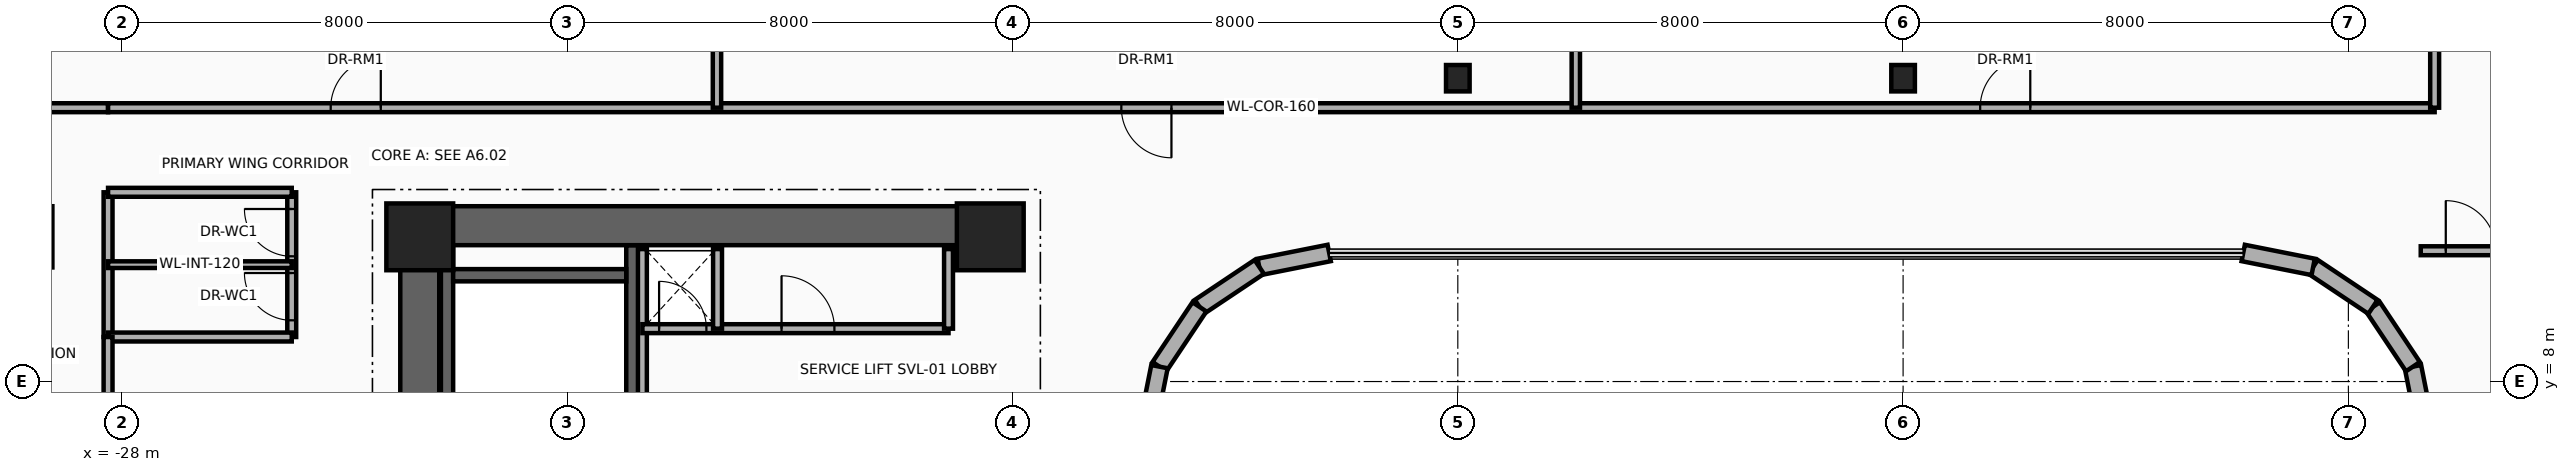
"""IFC4 building model, lengths in metres.
Left out: names, types, materials, properties, quantities, classifications, styles, units other than length and angle.
Written with IfcOpenShell. Run it as: python <this file> out.ifc"""

import sys

from ifc_helpers import new_model, si_unit, direction, frame, frame_2d, origin, origin_2d, place, context, subcontext, project, spatial, rectangle, i_section, extrude, source, transform, mapped, element, fill, save


model = new_model("IFC4")
c1 = context("Model", 3, precision=1e-05, world=origin(), true_north=direction((0.0, 1.0)))
c2 = subcontext(c1, "Body", "Model", "MODEL_VIEW")
j1 = project(units=[si_unit("LENGTHUNIT", "METRE"), si_unit("PLANEANGLEUNIT", "RADIAN")], contexts=[c1])
p1 = place(None, origin())
s1 = spatial("IfcSite", under=j1, at=p1, CompositionType="ELEMENT")
p2 = place(p1, origin())
s2 = spatial("IfcBuilding", under=s1, at=p2, CompositionType="ELEMENT")
p3 = place(p2, frame((0.0, 0.0, 142.7)))
s3 = spatial("IfcBuildingStorey", under=s2, at=p3, CompositionType="ELEMENT", Elevation=142.7)
for number, where, z_axis, x_axis in (
    (1, (-22.16, 1.78, 0.0), (0.0, 0.0, 1.0), (0.0, 1.0, 0.0)),
    (2, (-18.83, 1.78, 0.0), (0.0, 0.0, 1.0), (0.0, 1.0, 0.0)),
):
    element("IfcWall", number, at=place(p3, frame(where, z_axis=z_axis, x_axis=x_axis)), inside=s3, PredefinedType="SHEAR", context=c2, shape_type="SweptSolid", body=[
        extrude(rectangle(XDim=8.67, YDim=0.22, at=frame_2d((4.335, 0.0))), origin(), (0.0, 0.0, 1.0), 3.46),
    ])
p4 = place(p3, frame((-22.05, 9.91, 0.0), z_axis=(0.0, 0.0, 1.0), x_axis=(1.0, 0.0, 0.0)))
e3 = element("IfcWall", 3, at=p4, inside=s3, PredefinedType="SHEAR", context=c2, shape_type="SweptSolid", body=[
    extrude(rectangle(XDim=3.11, YDim=0.22, at=frame_2d((1.555, 0.0))), origin(), (0.0, 0.0, 1.0), 3.46),
])
p5 = place(p3, frame((-22.65, -11.15, 0.0), z_axis=(0.0, 0.0, 1.0), x_axis=(0.0, 1.0, 0.0)))
e4 = element("IfcWall", 4, at=p5, inside=s3, PredefinedType="SHEAR", context=c2, shape_type="SweptSolid", body=[
    extrude(rectangle(XDim=22.3, YDim=0.7, at=frame_2d((11.15, 0.0))), origin(), (0.0, 0.0, 1.0), 3.46),
])
p6 = place(p3, frame((-22.65, 10.8, 0.0), z_axis=(0.0, 0.0, 1.0), x_axis=(1.0, 0.0, 0.0)))
e5 = element("IfcWall", 5, at=p6, inside=s3, PredefinedType="SHEAR", context=c2, shape_type="SweptSolid", body=[
    extrude(rectangle(XDim=10.25, YDim=0.7, at=frame_2d((5.125, 0.0))), origin(), (0.0, 0.0, 1.0), 3.46),
])
m1 = source(origin(), c2, "Body", "SweptSolid", [
    extrude(rectangle(XDim=1.2, YDim=1.2, at=origin_2d()), origin(), (0.0, 0.0, 1.0), 3.7),
])
for number, where, z_axis, x_axis in (
    (6, (-22.65, 10.6, 0.0), (0.0, 0.0, 1.0), (1.0, 0.0, 0.0)),
    (7, (-12.4, 10.6, 0.0), (0.0, 0.0, 1.0), (1.0, 0.0, 0.0)),
):
    element("IfcColumn", number, at=place(p3, frame(where, z_axis=z_axis, x_axis=x_axis)), inside=s3, PredefinedType="COLUMN", context=c2, shape_type="MappedRepresentation", body=[
        mapped(m1, transform((0.0, 0.0, 0.0), x_axis=(1.0, 0.0, 0.0), y_axis=(0.0, 1.0, 0.0), z_axis=(0.0, 0.0, 1.0), scale=1.0)),
    ])
m2 = source(origin(), c2, "Body", "SweptSolid", [
    extrude(i_section(OverallWidth=0.424, OverallDepth=0.474, WebThickness=0.048, FlangeThickness=0.077, at=origin_2d()), origin(), (0.0, 0.0, 1.0), 3.7),
])
for number, where, z_axis, x_axis in (
    (8, (-4.0, 13.45, 0.0), (0.0, 0.0, 1.0), (1.0, 0.0, 0.0)),
    (9, (4.0, 13.45, 0.0), (0.0, 0.0, 1.0), (1.0, 0.0, 0.0)),
):
    element("IfcColumn", number, at=place(p3, frame(where, z_axis=z_axis, x_axis=x_axis)), inside=s3, PredefinedType="COLUMN", context=c2, shape_type="MappedRepresentation", body=[
        mapped(m2, transform((0.0, 0.0, 0.0), x_axis=(1.0, 0.0, 0.0), y_axis=(0.0, 1.0, 0.0), z_axis=(0.0, 0.0, 1.0), scale=1.0)),
    ])
p7 = place(p3, frame((13.41, 7.011, 0.0), z_axis=(0.0, 0.0, 1.0), x_axis=(-0.195090163074, 0.980785312019, 0.0)))
e10 = element("IfcWall", 10, at=p7, inside=s3, PredefinedType="SOLIDWALL", context=c2, shape_type="SweptSolid", body=[
    extrude(rectangle(XDim=1.281, YDim=0.3, at=frame_2d((0.641, 0.0))), origin(), (0.0, 0.0, 1.0), 3.46),
])
for number, where, z_axis, x_axis in (
    (11, (13.16, 8.268, 0.0), (0.0, 0.0, 1.0), (-0.556, 0.831, 0.0)),
    (12, (12.442, 9.342, 0.0), (0.0, 0.0, 1.0), (-0.831, 0.556, 0.0)),
):
    element("IfcWall", number, at=place(p3, frame(where, z_axis=z_axis, x_axis=x_axis)), inside=s3, PredefinedType="SOLIDWALL", context=c2, shape_type="SweptSolid", body=[
        extrude(rectangle(XDim=1.292, YDim=0.3, at=frame_2d((0.646, 0.0))), origin(), (0.0, 0.0, 1.0), 3.46),
    ])
for number, where, z_axis, x_axis in (
    (13, (11.367, 10.06, 0.0), (0.0, 0.0, 1.0), (-0.981, 0.195, 0.0)),
    (14, (-6.311, 10.31, 0.0), (0.0, 0.0, 1.0), (-0.981, -0.195, 0.0)),
):
    element("IfcWall", number, at=place(p3, frame(where, z_axis=z_axis, x_axis=x_axis)), inside=s3, PredefinedType="SOLIDWALL", context=c2, shape_type="SweptSolid", body=[
        extrude(rectangle(XDim=1.281, YDim=0.3, at=frame_2d((0.641, 0.0))), origin(), (0.0, 0.0, 1.0), 3.46),
    ])
p8 = place(p3, frame((-7.567, 10.06, 0.0), z_axis=(0.0, 0.0, 1.0), x_axis=(-0.831497739511, -0.555528135371, 0.0)))
e15 = element("IfcWall", 15, at=p8, inside=s3, PredefinedType="SOLIDWALL", context=c2, shape_type="SweptSolid", body=[
    extrude(rectangle(XDim=1.292, YDim=0.3, at=frame_2d((0.646, 0.0))), origin(), (0.0, 0.0, 1.0), 3.46),
])
p9 = place(p3, frame((-8.642, 9.342, 0.0), z_axis=(0.0, 0.0, 1.0), x_axis=(-0.555615398575, -0.831439431869, 0.0)))
e16 = element("IfcWall", 16, at=p9, inside=s3, PredefinedType="SOLIDWALL", context=c2, shape_type="SweptSolid", body=[
    extrude(rectangle(XDim=1.292, YDim=0.3, at=frame_2d((0.646, 0.0))), origin(), (0.0, 0.0, 1.0), 3.46),
])
p10 = place(p3, frame((-9.36, 8.268, 0.0), z_axis=(0.0, 0.0, 1.0), x_axis=(-0.195090163074, -0.980785312019, 0.0)))
e17 = element("IfcWall", 17, at=p10, inside=s3, PredefinedType="SOLIDWALL", context=c2, shape_type="SweptSolid", body=[
    extrude(rectangle(XDim=1.281, YDim=0.3, at=frame_2d((0.641, 0.0))), origin(), (0.0, 0.0, 1.0), 3.46),
])
p11 = place(p3, frame((-18.65, 7.45, 0.0), z_axis=(0.0, 0.0, 1.0), x_axis=(0.0, 1.0, 0.0)))
e18 = element("IfcWall", 18, at=p11, inside=s3, PredefinedType="PARTITIONING", context=c2, shape_type="SweptSolid", body=[
    extrude(rectangle(XDim=2.93, YDim=0.16, at=frame_2d((1.465, 0.0))), origin(), (0.0, 0.0, 1.0), 3.46),
])
p12 = place(p3, frame((-18.65, 8.95, 0.0), z_axis=(0.0, 0.0, 1.0), x_axis=(1.0, 0.0, 0.0)))
e19 = element("IfcWall", 19, at=p12, inside=s3, PredefinedType="PARTITIONING", context=c2, shape_type="SweptSolid", body=[
    extrude(rectangle(XDim=5.5, YDim=0.16, at=frame_2d((2.75, 0.0))), origin(), (0.0, 0.0, 1.0), 3.46),
])
p13 = place(p12, frame((0.3, 0.0, 0.0)))
e20 = element("IfcOpeningElement", 20, at=p13, cuts=e19, PredefinedType="OPENING", context=c2, shape_type="SweptSolid", body=[
    extrude(rectangle(XDim=0.85, YDim=2.05, at=frame_2d((0.425, 1.025))), frame((0.0, 0.095, 0.0), z_axis=(0.0, -1.0, 0.0), x_axis=(1.0, 0.0, 0.0)), (0.0, 0.0, 1.0), 0.19),
])
p14 = place(p12, frame((2.5, 0.0, 0.0)))
e21 = element("IfcOpeningElement", 21, at=p14, cuts=e19, PredefinedType="OPENING", context=c2, shape_type="SweptSolid", body=[
    extrude(rectangle(XDim=0.95, YDim=2.15, at=frame_2d((0.475, 1.075))), frame((0.0, 0.095, 0.0), z_axis=(0.0, -1.0, 0.0), x_axis=(1.0, 0.0, 0.0)), (0.0, 0.0, 1.0), 0.19),
])
for number, where, z_axis, x_axis in (
    (22, (-13.15, 8.95, 0.0), (0.0, 0.0, 1.0), (0.0, 1.0, 0.0)),
    (23, (-17.3, 8.95, 0.0), (0.0, 0.0, 1.0), (0.0, 1.0, 0.0)),
):
    element("IfcWall", number, at=place(p3, frame(where, z_axis=z_axis, x_axis=x_axis)), inside=s3, PredefinedType="PARTITIONING", context=c2, shape_type="SweptSolid", body=[
        extrude(rectangle(XDim=1.43, YDim=0.16, at=frame_2d((0.715, 0.0))), origin(), (0.0, 0.0, 1.0), 3.46),
    ])
p15 = place(p3, frame((-28.25, 8.8, 0.0), z_axis=(0.0, 0.0, 1.0), x_axis=(0.0, 1.0, 0.0)))
e24 = element("IfcWall", 24, at=p15, inside=s3, PredefinedType="PARTITIONING", context=c2, shape_type="SweptSolid", body=[
    extrude(rectangle(XDim=2.6, YDim=0.16, at=frame_2d((1.3, 0.0))), origin(), (0.0, 0.0, 1.0), 2.666),
])
p16 = place(p3, frame((-24.95, 8.8, 0.0), z_axis=(0.0, 0.0, 1.0), x_axis=(0.0, 1.0, 0.0)))
e25 = element("IfcWall", 25, at=p16, inside=s3, PredefinedType="PARTITIONING", context=c2, shape_type="SweptSolid", body=[
    extrude(rectangle(XDim=2.6, YDim=0.16, at=frame_2d((1.3, 0.0))), origin(), (0.0, 0.0, 1.0), 2.666),
])
p17 = place(p16, frame((0.3, 0.0, 0.0)))
e26 = element("IfcOpeningElement", 26, at=p17, cuts=e25, PredefinedType="OPENING", context=c2, shape_type="SweptSolid", body=[
    extrude(rectangle(XDim=0.85, YDim=2.1, at=frame_2d((0.425, 1.05))), frame((0.0, 0.095, 0.0), z_axis=(0.0, -1.0, 0.0), x_axis=(1.0, 0.0, 0.0)), (0.0, 0.0, 1.0), 0.19),
])
p18 = place(p16, frame((1.45, 0.0, 0.0)))
e27 = element("IfcOpeningElement", 27, at=p18, cuts=e25, PredefinedType="OPENING", context=c2, shape_type="SweptSolid", body=[
    extrude(rectangle(XDim=0.85, YDim=2.1, at=frame_2d((0.425, 1.05))), frame((0.0, 0.095, 0.0), z_axis=(0.0, -1.0, 0.0), x_axis=(1.0, 0.0, 0.0)), (0.0, 0.0, 1.0), 0.19),
])
for number, where, z_axis, x_axis in (
    (28, (-28.25, 8.8, 0.0), (0.0, 0.0, 1.0), (1.0, 0.0, 0.0)),
    (29, (-28.25, 11.4, 0.0), (0.0, 0.0, 1.0), (1.0, 0.0, 0.0)),
):
    element("IfcWall", number, at=place(p3, frame(where, z_axis=z_axis, x_axis=x_axis)), inside=s3, PredefinedType="PARTITIONING", context=c2, shape_type="SweptSolid", body=[
        extrude(rectangle(XDim=3.3, YDim=0.16, at=frame_2d((1.65, 0.0))), origin(), (0.0, 0.0, 1.0), 3.46),
    ])
p19 = place(p3, frame((-28.25, 10.1, 0.0), z_axis=(0.0, 0.0, 1.0), x_axis=(1.0, 0.0, 0.0)))
e30 = element("IfcWall", 30, at=p19, inside=s3, PredefinedType="PARTITIONING", context=c2, shape_type="SweptSolid", body=[
    extrude(rectangle(XDim=3.3, YDim=0.12, at=frame_2d((1.65, 0.0))), origin(), (0.0, 0.0, 1.0), 3.46),
])
p20 = place(p3, frame((-28.25, 5.2, 0.0), z_axis=(0.0, 0.0, 1.0), x_axis=(0.0, 1.0, 0.0)))
e31 = element("IfcWall", 31, at=p20, inside=s3, PredefinedType="PARTITIONING", context=c2, shape_type="SweptSolid", body=[
    extrude(rectangle(XDim=3.6, YDim=0.16, at=frame_2d((1.8, 0.0))), origin(), (0.0, 0.0, 1.0), 2.988),
])
p21 = place(p3, frame((-30.89, 12.92, 0.0), z_axis=(0.0, 0.0, 1.0), x_axis=(1.0, 0.0, 0.0)))
e32 = element("IfcWall", 32, at=p21, inside=s3, PredefinedType="PARTITIONING", context=c2, shape_type="SweptSolid", body=[
    extrude(rectangle(XDim=2.64, YDim=0.16, at=frame_2d((1.32, 0.0))), origin(), (0.0, 0.0, 1.0), 2.896),
])
p22 = place(p3, frame((-28.25, 12.92, 0.0), z_axis=(0.0, 0.0, 1.0), x_axis=(1.0, 0.0, 0.0)))
e33 = element("IfcWall", 33, at=p22, inside=s3, PredefinedType="PARTITIONING", context=c2, shape_type="SweptSolid", body=[
    extrude(rectangle(XDim=41.8, YDim=0.16, at=frame_2d((20.9, 0.0))), origin(), (0.0, 0.0, 1.0), 2.666),
])
p23 = place(p22, frame((4.0, 0.0, 0.0)))
e34 = element("IfcOpeningElement", 34, at=p23, cuts=e33, PredefinedType="OPENING", context=c2, shape_type="SweptSolid", body=[
    extrude(rectangle(XDim=0.9, YDim=2.1, at=frame_2d((0.45, 1.05))), frame((0.0, 0.095, 0.0), z_axis=(0.0, -1.0, 0.0), x_axis=(1.0, 0.0, 0.0)), (0.0, 0.0, 1.0), 0.19),
])
p24 = place(p22, frame((18.205, 0.0, 0.0)))
e35 = element("IfcOpeningElement", 35, at=p24, cuts=e33, PredefinedType="OPENING", context=c2, shape_type="SweptSolid", body=[
    extrude(rectangle(XDim=0.9, YDim=2.1, at=frame_2d((0.45, 1.05))), frame((0.0, 0.095, 0.0), z_axis=(0.0, -1.0, 0.0), x_axis=(1.0, 0.0, 0.0)), (0.0, 0.0, 1.0), 0.19),
])
p25 = place(p22, frame((33.635, 0.0, 0.0)))
e36 = element("IfcOpeningElement", 36, at=p25, cuts=e33, PredefinedType="OPENING", context=c2, shape_type="SweptSolid", body=[
    extrude(rectangle(XDim=0.9, YDim=2.1, at=frame_2d((0.45, 1.05))), frame((0.0, 0.095, 0.0), z_axis=(0.0, -1.0, 0.0), x_axis=(1.0, 0.0, 0.0)), (0.0, 0.0, 1.0), 0.19),
])
p26 = place(p3, frame((13.55, 12.92, 0.0), z_axis=(0.0, 0.0, 1.0), x_axis=(0.0, 1.0, 0.0)))
e37 = element("IfcWall", 37, at=p26, inside=s3, PredefinedType="PARTITIONING", context=c2, shape_type="SweptSolid", body=[
    extrude(rectangle(XDim=5.857, YDim=0.16, at=frame_2d((2.928, 0.0))), origin(), (0.0, 0.0, 1.0), 2.666),
])
p27 = place(p3, frame((-17.31, 12.92, 0.0), z_axis=(0.0, 0.0, 1.0), x_axis=(0.0, 1.0, 0.0)))
e38 = element("IfcWall", 38, at=p27, inside=s3, PredefinedType="PARTITIONING", context=c2, shape_type="SweptSolid", body=[
    extrude(rectangle(XDim=6.933, YDim=0.15, at=frame_2d((3.467, 0.0))), origin(), (0.0, 0.0, 1.0), 2.666),
])
p28 = place(p3, frame((-1.88, 12.92, 0.0), z_axis=(0.0, 0.0, 1.0), x_axis=(0.0, 1.0, 0.0)))
e39 = element("IfcWall", 39, at=p28, inside=s3, PredefinedType="PARTITIONING", context=c2, shape_type="SweptSolid", body=[
    extrude(rectangle(XDim=7.055, YDim=0.15, at=frame_2d((3.528, 0.0))), origin(), (0.0, 0.0, 1.0), 2.666),
])
p29 = place(p3, frame((13.3, 10.35, 0.0), z_axis=(0.0, 0.0, 1.0), x_axis=(1.0, 0.0, 0.0)))
e40 = element("IfcWall", 40, at=p29, inside=s3, PredefinedType="PARTITIONING", context=c2, shape_type="SweptSolid", body=[
    extrude(rectangle(XDim=2.1, YDim=0.16, at=frame_2d((1.05, 0.0))), origin(), (0.0, 0.0, 1.0), 2.666),
])
p30 = place(p29, frame((0.45, 0.0, 0.0)))
e41 = element("IfcOpeningElement", 41, at=p30, cuts=e40, PredefinedType="OPENING", context=c2, shape_type="SweptSolid", body=[
    extrude(rectangle(XDim=0.9, YDim=2.1, at=frame_2d((0.45, 1.05))), frame((0.0, 0.095, 0.0), z_axis=(0.0, -1.0, 0.0), x_axis=(1.0, 0.0, 0.0)), (0.0, 0.0, 1.0), 0.19),
])
p31 = place(p13, origin())
e42 = element("IfcDoor", 42, at=p31, inside=s3, OperationType="SINGLE_SWING_LEFT", PredefinedType="DOOR", context=c2, shape_type="SweptSolid", body=[
    extrude(rectangle(XDim=0.85, YDim=2.05, at=frame_2d((0.425, 1.025))), frame((0.0, 0.025, 0.0), z_axis=(0.0, -1.0, 0.0), x_axis=(1.0, 0.0, 0.0)), (0.0, 0.0, 1.0), 0.05),
])
fill(e20, e42)
p32 = place(p14, origin())
e43 = element("IfcDoor", 43, at=p32, inside=s3, OperationType="SINGLE_SWING_RIGHT", PredefinedType="DOOR", context=c2, shape_type="SweptSolid", body=[
    extrude(rectangle(XDim=0.95, YDim=2.15, at=frame_2d((0.475, 1.075))), frame((0.0, 0.025, 0.0), z_axis=(0.0, -1.0, 0.0), x_axis=(1.0, 0.0, 0.0)), (0.0, 0.0, 1.0), 0.05),
])
fill(e21, e43)
p33 = place(p17, origin())
e44 = element("IfcDoor", 44, at=p33, inside=s3, OperationType="SINGLE_SWING_RIGHT", PredefinedType="DOOR", context=c2, shape_type="SweptSolid", body=[
    extrude(rectangle(XDim=0.85, YDim=2.1, at=frame_2d((0.425, 1.05))), frame((0.0, 0.025, 0.0), z_axis=(0.0, -1.0, 0.0), x_axis=(1.0, 0.0, 0.0)), (0.0, 0.0, 1.0), 0.05),
])
fill(e26, e44)
p34 = place(p18, origin())
e45 = element("IfcDoor", 45, at=p34, inside=s3, OperationType="SINGLE_SWING_LEFT", PredefinedType="DOOR", context=c2, shape_type="SweptSolid", body=[
    extrude(rectangle(XDim=0.85, YDim=2.1, at=frame_2d((0.425, 1.05))), frame((0.0, 0.025, 0.0), z_axis=(0.0, -1.0, 0.0), x_axis=(1.0, 0.0, 0.0)), (0.0, 0.0, 1.0), 0.05),
])
fill(e27, e45)
p35 = place(p23, origin())
e46 = element("IfcDoor", 46, at=p35, inside=s3, OperationType="SINGLE_SWING_RIGHT", PredefinedType="DOOR", context=c2, shape_type="SweptSolid", body=[
    extrude(rectangle(XDim=0.9, YDim=2.1, at=frame_2d((0.45, 1.05))), frame((0.0, 0.025, 0.0), z_axis=(0.0, -1.0, 0.0), x_axis=(1.0, 0.0, 0.0)), (0.0, 0.0, 1.0), 0.05),
])
fill(e34, e46)
p36 = place(p24, frame((0.9, 0.0, 0.0), z_axis=(0.0, 0.0, 1.0), x_axis=(-1.0, 0.0, 0.0)))
e47 = element("IfcDoor", 47, at=p36, inside=s3, OperationType="SINGLE_SWING_LEFT", PredefinedType="DOOR", context=c2, shape_type="SweptSolid", body=[
    extrude(rectangle(XDim=0.9, YDim=2.1, at=frame_2d((0.45, 1.05))), frame((0.0, 0.025, 0.0), z_axis=(0.0, -1.0, 0.0), x_axis=(1.0, 0.0, 0.0)), (0.0, 0.0, 1.0), 0.05),
])
fill(e35, e47)
p37 = place(p25, origin())
e48 = element("IfcDoor", 48, at=p37, inside=s3, OperationType="SINGLE_SWING_RIGHT", PredefinedType="DOOR", context=c2, shape_type="SweptSolid", body=[
    extrude(rectangle(XDim=0.9, YDim=2.1, at=frame_2d((0.45, 1.05))), frame((0.0, 0.025, 0.0), z_axis=(0.0, -1.0, 0.0), x_axis=(1.0, 0.0, 0.0)), (0.0, 0.0, 1.0), 0.05),
])
fill(e36, e48)
p38 = place(p30, origin())
e49 = element("IfcDoor", 49, at=p38, inside=s3, OperationType="SINGLE_SWING_RIGHT", PredefinedType="DOOR", context=c2, shape_type="SweptSolid", body=[
    extrude(rectangle(XDim=0.9, YDim=2.1, at=frame_2d((0.45, 1.05))), frame((0.0, 0.025, 0.0), z_axis=(0.0, -1.0, 0.0), x_axis=(1.0, 0.0, 0.0)), (0.0, 0.0, 1.0), 0.05),
])
fill(e41, e49)
save(model, sys.argv[1])
